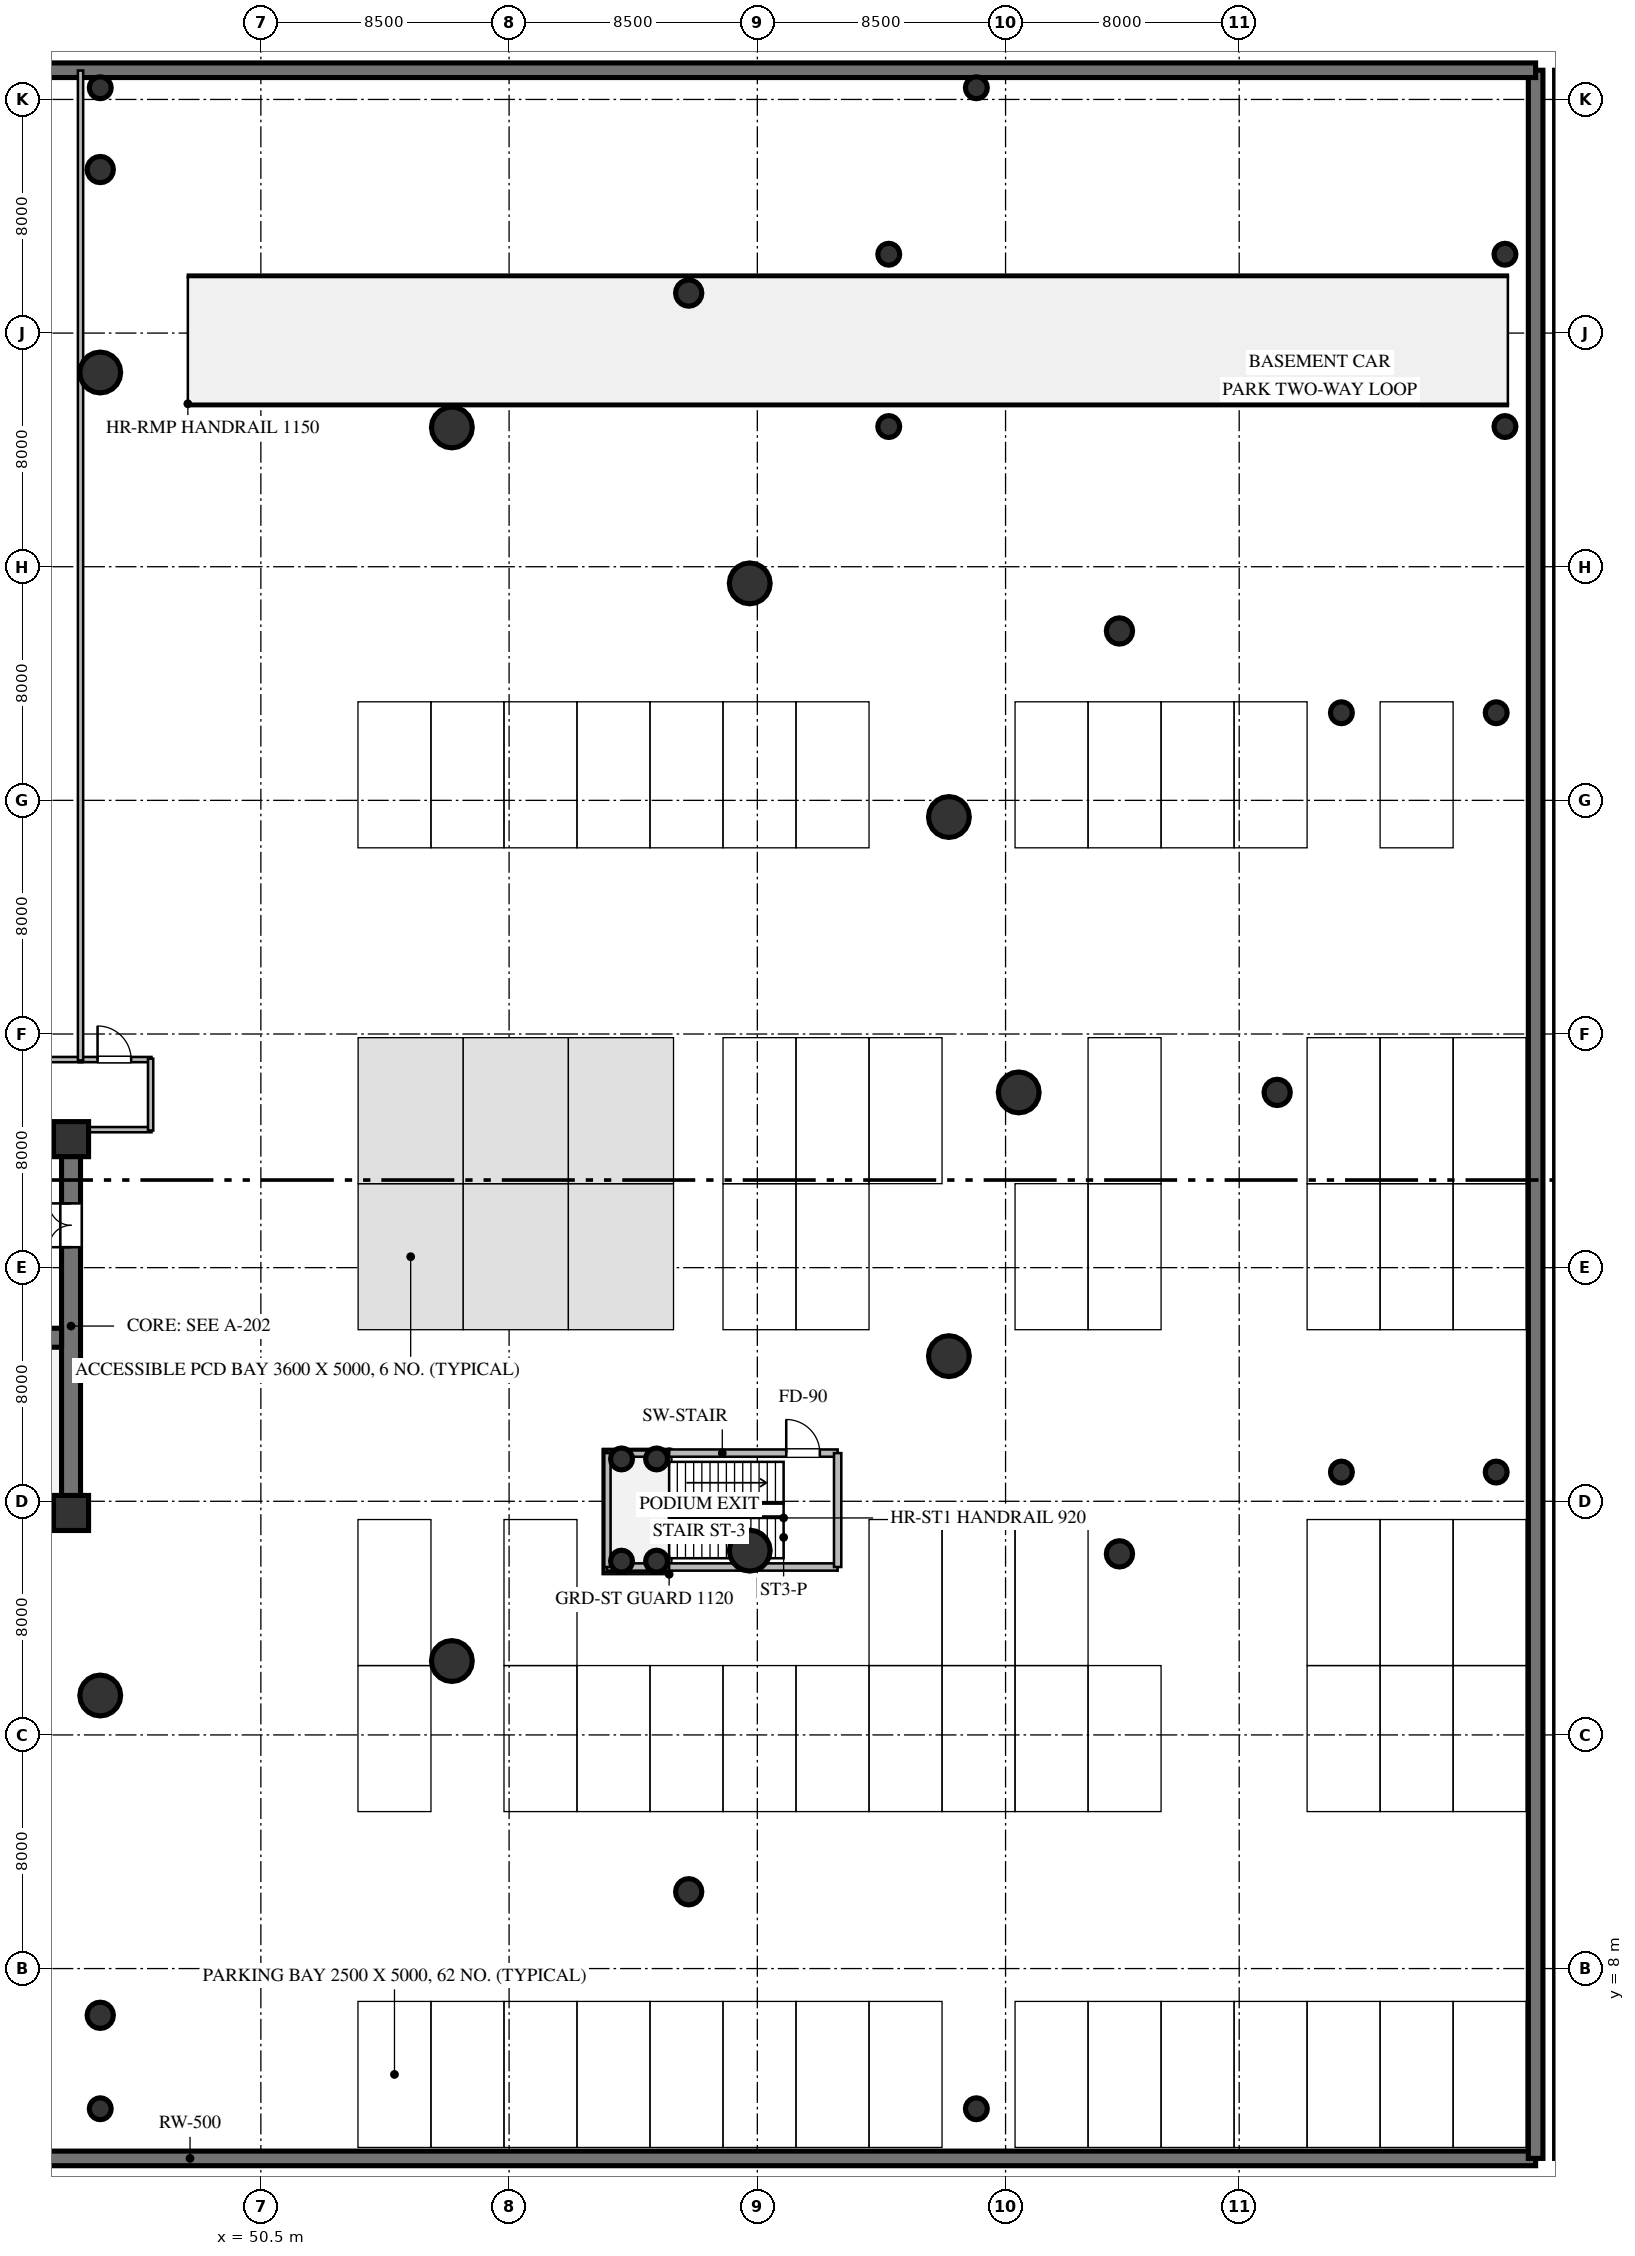
"""IFC4 building model, lengths in metres.
Left out: names, types, materials, properties, quantities, classifications, styles, units other than length and angle.
Written with IfcOpenShell. Run it as: python <this file> out.ifc"""

import sys

from ifc_helpers import new_model, si_unit, direction, frame, frame_2d, origin, origin_2d, place, context, subcontext, project, spatial, rectangle, circle, extrude, element, fill, save


model = new_model("IFC4")
c1 = context("Model", 3, precision=1e-05, world=origin(), true_north=direction((0.0, 1.0)))
c2 = subcontext(c1, "Body", "Model", "MODEL_VIEW")
j1 = project(units=[si_unit("LENGTHUNIT", "METRE"), si_unit("PLANEANGLEUNIT", "RADIAN")], contexts=[c1])
p1 = place(None, origin())
s1 = spatial("IfcSite", under=j1, at=p1, CompositionType="ELEMENT")
p2 = place(p1, origin())
s2 = spatial("IfcBuilding", under=s1, at=p2, CompositionType="ELEMENT")
p3 = place(p2, frame((0.0, 0.0, -5.4)))
s3 = spatial("IfcBuildingStorey", under=s2, at=p3, CompositionType="ELEMENT", Elevation=-5.4)
p4 = place(p3, frame((2.0, 1.5, 0.0), z_axis=(0.0, 0.0, 1.0), x_axis=(1.0, 0.0, 0.0)))
e1 = element("IfcWall", 1, at=p4, inside=s3, PredefinedType="SHEAR", context=c2, shape_type="SweptSolid", body=[
    extrude(rectangle(XDim=92.15, YDim=0.5, at=frame_2d((46.075, 0.0))), origin(), (0.0, 0.0, 1.0), 5.2),
])
p5 = place(p3, frame((94.15, 1.5, 0.0), z_axis=(0.0, 0.0, 1.0), x_axis=(0.0, 1.0, 0.0)))
e2 = element("IfcWall", 2, at=p5, inside=s3, PredefinedType="SHEAR", context=c2, shape_type="SweptSolid", body=[
    extrude(rectangle(XDim=71.5, YDim=0.5, at=frame_2d((35.75, 0.0))), origin(), (0.0, 0.0, 1.0), 5.2),
])
p6 = place(p3, frame((94.15, 73.0, 0.0), z_axis=(0.0, 0.0, 1.0), x_axis=(-1.0, 0.0, 0.0)))
e3 = element("IfcWall", 3, at=p6, inside=s3, PredefinedType="SHEAR", context=c2, shape_type="SweptSolid", body=[
    extrude(rectangle(XDim=92.15, YDim=0.5, at=frame_2d((46.075, 0.0))), origin(), (0.0, 0.0, 1.0), 5.2),
])
p7 = place(p3, frame((95.05, 73.0, 0.0), z_axis=(0.0, 0.0, 1.0), x_axis=(0.0, -1.0, 0.0)))
e4 = element("IfcWall", 4, at=p7, inside=s3, PredefinedType="SHEAR", context=c2, shape_type="SweptSolid", body=[
    extrude(rectangle(XDim=71.5, YDim=0.5, at=frame_2d((35.75, 0.0))), origin(), (0.0, 0.0, 1.0), 5.2),
])
for number, where, z_axis, x_axis in (
    (5, (45.0, 3.2, 0.0), (0.0, 0.0, 1.0), (1.0, 0.0, 0.0)),
    (6, (45.0, 72.4, 0.0), (0.0, 0.0, 1.0), (1.0, 0.0, 0.0)),
    (7, (75.0, 3.2, 0.0), (0.0, 0.0, 1.0), (1.0, 0.0, 0.0)),
    (8, (75.0, 72.4, 0.0), (0.0, 0.0, 1.0), (1.0, 0.0, 0.0)),
):
    element("IfcColumn", number, at=place(p3, frame(where, z_axis=z_axis, x_axis=x_axis)), inside=s3, PredefinedType="COLUMN", context=c2, shape_type="SweptSolid", body=[
        extrude(circle(Radius=0.375, at=origin_2d()), origin(), (0.0, 0.0, 1.0), 5.2),
    ])
for number, where, z_axis, x_axis in (
    (9, (72.0, 60.8, 0.0), (0.0, 0.0, 1.0), (1.0, 0.0, 0.0)),
    (10, (72.0, 66.7, 0.0), (0.0, 0.0, 1.0), (1.0, 0.0, 0.0)),
):
    element("IfcColumn", number, at=place(p3, frame(where, z_axis=z_axis, x_axis=x_axis)), inside=s3, PredefinedType="COLUMN", context=c2, shape_type="SweptSolid", body=[
        extrude(circle(Radius=0.375, at=origin_2d()), origin(), (0.0, 0.0, 1.0), 2.587),
    ])
for number, where, z_axis, x_axis in (
    (11, (93.1, 60.8, 0.0), (0.0, 0.0, 1.0), (1.0, 0.0, 0.0)),
    (12, (93.1, 66.7, 0.0), (0.0, 0.0, 1.0), (1.0, 0.0, 0.0)),
):
    element("IfcColumn", number, at=place(p3, frame(where, z_axis=z_axis, x_axis=x_axis)), inside=s3, PredefinedType="COLUMN", context=c2, shape_type="SweptSolid", body=[
        extrude(circle(Radius=0.375, at=origin_2d()), origin(), (0.0, 0.0, 1.0), 5.12),
    ])
for number, where, z_axis, x_axis in (
    (13, (21.675, 23.6, 0.0), (0.0, 0.0, 1.0), (1.0, 0.0, 0.0)),
    (14, (21.675, 36.4, 0.0), (0.0, 0.0, 1.0), (1.0, 0.0, 0.0)),
):
    element("IfcWall", number, at=place(p3, frame(where, z_axis=z_axis, x_axis=x_axis)), inside=s3, PredefinedType="SHEAR", context=c2, shape_type="SweptSolid", body=[
        extrude(rectangle(XDim=22.65, YDim=0.65, at=frame_2d((11.325, 0.0))), origin(), (0.0, 0.0, 1.0), 5.12),
    ])
p8 = place(p3, frame((44.0, 23.925, 0.0), z_axis=(0.0, 0.0, 1.0), x_axis=(0.0, 1.0, 0.0)))
e15 = element("IfcWall", 15, at=p8, inside=s3, PredefinedType="SHEAR", context=c2, shape_type="SweptSolid", body=[
    extrude(rectangle(XDim=12.15, YDim=0.65, at=frame_2d((6.075, 0.0))), origin(), (0.0, 0.0, 1.0), 5.12),
])
p9 = place(p8, frame((8.775, 0.0, 0.0)))
e16 = element("IfcOpeningElement", 16, at=p9, cuts=e15, PredefinedType="OPENING", context=c2, shape_type="SweptSolid", body=[
    extrude(rectangle(XDim=1.5, YDim=2.15, at=frame_2d((0.75, 1.075))), frame((0.0, 0.335, 0.0), z_axis=(0.0, -1.0, 0.0), x_axis=(1.0, 0.0, 0.0)), (0.0, 0.0, 1.0), 0.67),
])
p10 = place(p3, frame((22.325, 29.6, 0.0), z_axis=(0.0, 0.0, 1.0), x_axis=(1.0, 0.0, 0.0)))
e17 = element("IfcWall", 17, at=p10, inside=s3, PredefinedType="SHEAR", context=c2, shape_type="SweptSolid", body=[
    extrude(rectangle(XDim=21.35, YDim=0.65, at=frame_2d((10.675, 0.0))), origin(), (0.0, 0.0, 1.0), 5.12),
])
p11 = place(p10, frame((12.125, 0.0, 0.0)))
e18 = element("IfcOpeningElement", 18, at=p11, cuts=e17, PredefinedType="OPENING", context=c2, shape_type="SweptSolid", body=[
    extrude(rectangle(XDim=1.15, YDim=2.1, at=frame_2d((0.575, 1.05))), frame((0.0, 0.335, 0.0), z_axis=(0.0, -1.0, 0.0), x_axis=(1.0, 0.0, 0.0)), (0.0, 0.0, 1.0), 0.67),
])
for number, where, z_axis, x_axis in (
    (19, (44.0, 23.6, 0.0), (0.0, 0.0, 1.0), (1.0, 0.0, 0.0)),
    (20, (44.0, 36.4, 0.0), (0.0, 0.0, 1.0), (1.0, 0.0, 0.0)),
):
    element("IfcColumn", number, at=place(p3, frame(where, z_axis=z_axis, x_axis=x_axis)), inside=s3, PredefinedType="COLUMN", context=c2, shape_type="SweptSolid", body=[
        extrude(rectangle(XDim=1.2, YDim=1.2, at=origin_2d()), origin(), (0.0, 0.0, 1.0), 5.4),
    ])
for number, where, z_axis, x_axis in (
    (21, (76.45, 38.0, 0.0), (0.0, 0.0, 1.0), (1.0, 0.0, 0.0)),
    (22, (74.06, 47.43, 0.0), (0.0, 0.0, 1.0), (1.0, 0.0, 0.0)),
    (23, (67.24, 55.43, 0.0), (0.0, 0.0, 1.0), (1.0, 0.0, 0.0)),
    (24, (57.04, 60.77, 0.0), (0.0, 0.0, 1.0), (1.0, 0.0, 0.0)),
    (25, (45.0, 62.65, 0.0), (0.0, 0.0, 1.0), (1.0, 0.0, 0.0)),
    (26, (45.0, 17.35, 0.0), (0.0, 0.0, 1.0), (1.0, 0.0, 0.0)),
    (27, (57.04, 18.53, 0.0), (0.0, 0.0, 1.0), (1.0, 0.0, 0.0)),
    (28, (67.24, 22.31, 0.0), (0.0, 0.0, 1.0), (1.0, 0.0, 0.0)),
    (29, (74.06, 28.97, 0.0), (0.0, 0.0, 1.0), (1.0, 0.0, 0.0)),
):
    element("IfcColumn", number, at=place(p3, frame(where, z_axis=z_axis, x_axis=x_axis)), inside=s3, PredefinedType="COLUMN", context=c2, shape_type="SweptSolid", body=[
        extrude(circle(Radius=0.7, at=origin_2d()), origin(), (0.0, 0.0, 1.0), 5.4),
    ])
for number, where, z_axis, x_axis in (
    (30, (85.3, 38.0, 0.0), (0.0, 0.0, 1.0), (1.0, 0.0, 0.0)),
    (31, (79.9, 53.8, 0.0), (0.0, 0.0, 1.0), (1.0, 0.0, 0.0)),
    (32, (65.15, 65.37, 0.0), (0.0, 0.0, 1.0), (1.0, 0.0, 0.0)),
    (33, (45.0, 69.6, 0.0), (0.0, 0.0, 1.0), (1.0, 0.0, 0.0)),
    (34, (45.0, 6.4, 0.0), (0.0, 0.0, 1.0), (1.0, 0.0, 0.0)),
    (35, (65.15, 10.63, 0.0), (0.0, 0.0, 1.0), (1.0, 0.0, 0.0)),
    (36, (79.9, 22.2, 0.0), (0.0, 0.0, 1.0), (1.0, 0.0, 0.0)),
):
    element("IfcColumn", number, at=place(p3, frame(where, z_axis=z_axis, x_axis=x_axis)), inside=s3, PredefinedType="COLUMN", context=c2, shape_type="SweptSolid", body=[
        extrude(circle(Radius=0.45, at=origin_2d()), origin(), (0.0, 0.0, 1.0), 5.4),
    ])
for number, where, z_axis, x_axis in (
    (37, (87.5, 25.0, 0.0), (0.0, 0.0, 1.0), (1.0, 0.0, 0.0)),
    (38, (92.8, 25.0, 0.0), (0.0, 0.0, 1.0), (1.0, 0.0, 0.0)),
    (39, (92.8, 51.0, 0.0), (0.0, 0.0, 1.0), (1.0, 0.0, 0.0)),
    (40, (87.5, 51.0, 0.0), (0.0, 0.0, 1.0), (1.0, 0.0, 0.0)),
    (41, (62.85, 21.95, 0.0), (0.0, 0.0, 1.0), (1.0, 0.0, 0.0)),
    (42, (62.85, 25.45, 0.0), (0.0, 0.0, 1.0), (1.0, 0.0, 0.0)),
    (43, (64.05, 21.95, 0.0), (0.0, 0.0, 1.0), (1.0, 0.0, 0.0)),
    (44, (64.05, 25.45, 0.0), (0.0, 0.0, 1.0), (1.0, 0.0, 0.0)),
):
    element("IfcColumn", number, at=place(p3, frame(where, z_axis=z_axis, x_axis=x_axis)), inside=s3, PredefinedType="COLUMN", context=c2, shape_type="SweptSolid", body=[
        extrude(circle(Radius=0.375, at=origin_2d()), origin(), (0.0, 0.0, 1.0), 5.4),
    ])
p12 = place(p3, frame((62.35, 25.65, 0.0), z_axis=(0.0, 0.0, 1.0), x_axis=(1.0, 0.0, 0.0)))
e45 = element("IfcWall", 45, at=p12, inside=s3, PredefinedType="SOLIDWALL", context=c2, shape_type="SweptSolid", body=[
    extrude(rectangle(XDim=7.9, YDim=0.25, at=frame_2d((3.95, 0.0))), origin(), (0.0, 0.0, 1.0), 5.12),
])
p13 = place(p12, frame((6.14, 0.0, 0.0)))
e46 = element("IfcOpeningElement", 46, at=p13, cuts=e45, PredefinedType="OPENING", context=c2, shape_type="SweptSolid", body=[
    extrude(rectangle(XDim=1.15, YDim=2.1, at=frame_2d((0.575, 1.05))), frame((0.0, 0.135, 0.0), z_axis=(0.0, -1.0, 0.0), x_axis=(1.0, 0.0, 0.0)), (0.0, 0.0, 1.0), 0.27),
])
p14 = place(p3, frame((62.35, 21.75, 0.0), z_axis=(0.0, 0.0, 1.0), x_axis=(1.0, 0.0, 0.0)))
e47 = element("IfcWall", 47, at=p14, inside=s3, PredefinedType="SOLIDWALL", context=c2, shape_type="SweptSolid", body=[
    extrude(rectangle(XDim=7.9, YDim=0.25, at=frame_2d((3.95, 0.0))), origin(), (0.0, 0.0, 1.0), 5.12),
])
p15 = place(p3, frame((62.35, 21.75, 0.0), z_axis=(0.0, 0.0, 1.0), x_axis=(0.0, 1.0, 0.0)))
e48 = element("IfcWall", 48, at=p15, inside=s3, PredefinedType="SOLIDWALL", context=c2, shape_type="SweptSolid", body=[
    extrude(rectangle(XDim=3.9, YDim=0.25, at=frame_2d((1.95, 0.0))), origin(), (0.0, 0.0, 1.0), 2.187),
])
p16 = place(p3, frame((70.25, 21.75, 0.0), z_axis=(0.0, 0.0, 1.0), x_axis=(0.0, 1.0, 0.0)))
e49 = element("IfcWall", 49, at=p16, inside=s3, PredefinedType="SOLIDWALL", context=c2, shape_type="SweptSolid", body=[
    extrude(rectangle(XDim=3.9, YDim=0.25, at=frame_2d((1.95, 0.0))), origin(), (0.0, 0.0, 1.0), 5.12),
])
p17 = place(p3, frame((44.26, 39.125, 0.0), z_axis=(0.0, 0.0, 1.0), x_axis=(1.0, 0.0, 0.0)))
e50 = element("IfcWall", 50, at=p17, inside=s3, PredefinedType="PARTITIONING", context=c2, shape_type="SweptSolid", body=[
    extrude(rectangle(XDim=2.495, YDim=0.18, at=frame_2d((1.248, 0.0))), origin(), (0.0, 0.0, 1.0), 5.12),
])
p18 = place(p17, frame((0.648, 0.0, 0.0)))
e51 = element("IfcOpeningElement", 51, at=p18, cuts=e50, PredefinedType="OPENING", context=c2, shape_type="SweptSolid", body=[
    extrude(rectangle(XDim=1.15, YDim=2.1, at=frame_2d((0.575, 1.05))), frame((0.0, 0.1, 0.0), z_axis=(0.0, -1.0, 0.0), x_axis=(1.0, 0.0, 0.0)), (0.0, 0.0, 1.0), 0.2),
])
p19 = place(p3, frame((46.755, 36.725, 0.0), z_axis=(0.0, 0.0, 1.0), x_axis=(-1.0, 0.0, 0.0)))
e52 = element("IfcWall", 52, at=p19, inside=s3, PredefinedType="PARTITIONING", context=c2, shape_type="SweptSolid", body=[
    extrude(rectangle(XDim=2.495, YDim=0.18, at=frame_2d((1.248, 0.0))), origin(), (0.0, 0.0, 1.0), 4.26),
])
p20 = place(p3, frame((46.725, 39.155, 0.0), z_axis=(0.0, 0.0, 1.0), x_axis=(0.0, -1.0, 0.0)))
e53 = element("IfcWall", 53, at=p20, inside=s3, PredefinedType="PARTITIONING", context=c2, shape_type="SweptSolid", body=[
    extrude(rectangle(XDim=2.46, YDim=0.18, at=frame_2d((1.23, 0.0))), origin(), (0.0, 0.0, 1.0), 5.12),
])
p21 = place(p3, frame((25.935, 39.125, 0.0), z_axis=(0.0, 0.0, 1.0), x_axis=(1.0, 0.0, 0.0)))
e54 = element("IfcWall", 54, at=p21, inside=s3, PredefinedType="PARTITIONING", context=c2, shape_type="SweptSolid", body=[
    extrude(rectangle(XDim=18.455, YDim=0.18, at=frame_2d((9.228, 0.0))), origin(), (0.0, 0.0, 1.0), 5.12),
])
p22 = place(p21, frame((8.627, 0.0, 0.0)))
e55 = element("IfcOpeningElement", 55, at=p22, cuts=e54, PredefinedType="OPENING", context=c2, shape_type="SweptSolid", body=[
    extrude(rectangle(XDim=1.15, YDim=2.1, at=frame_2d((0.575, 1.05))), frame((0.0, 0.1, 0.0), z_axis=(0.0, -1.0, 0.0), x_axis=(1.0, 0.0, 0.0)), (0.0, 0.0, 1.0), 0.2),
])
p23 = place(p3, frame((44.325, 39.095, 0.0), z_axis=(0.0, 0.0, 1.0), x_axis=(0.0, 1.0, 0.0)))
e56 = element("IfcWall", 56, at=p23, inside=s3, PredefinedType="PARTITIONING", context=c2, shape_type="SweptSolid", body=[
    extrude(rectangle(XDim=33.895, YDim=0.18, at=frame_2d((16.948, 0.0))), origin(), (0.0, 0.0, 1.0), 4.65),
])
p24 = place(p9, origin())
e57 = element("IfcDoor", 57, at=p24, inside=s3, OperationType="DOUBLE_DOOR_SINGLE_SWING", PredefinedType="DOOR", context=c2, shape_type="SweptSolid", body=[
    extrude(rectangle(XDim=1.5, YDim=2.15, at=frame_2d((0.75, 1.075))), frame((0.0, 0.025, 0.0), z_axis=(0.0, -1.0, 0.0), x_axis=(1.0, 0.0, 0.0)), (0.0, 0.0, 1.0), 0.05),
])
fill(e16, e57)
p25 = place(p13, origin())
e58 = element("IfcDoor", 58, at=p25, inside=s3, OperationType="SINGLE_SWING_LEFT", PredefinedType="DOOR", context=c2, shape_type="SweptSolid", body=[
    extrude(rectangle(XDim=1.15, YDim=2.1, at=frame_2d((0.575, 1.05))), frame((0.0, 0.025, 0.0), z_axis=(0.0, -1.0, 0.0), x_axis=(1.0, 0.0, 0.0)), (0.0, 0.0, 1.0), 0.05),
])
fill(e46, e58)
p26 = place(p18, origin())
e59 = element("IfcDoor", 59, at=p26, inside=s3, OperationType="SINGLE_SWING_LEFT", PredefinedType="DOOR", context=c2, shape_type="SweptSolid", body=[
    extrude(rectangle(XDim=1.15, YDim=2.1, at=frame_2d((0.575, 1.05))), frame((0.0, 0.025, 0.0), z_axis=(0.0, -1.0, 0.0), x_axis=(1.0, 0.0, 0.0)), (0.0, 0.0, 1.0), 0.05),
])
fill(e51, e59)
save(model, sys.argv[1])
